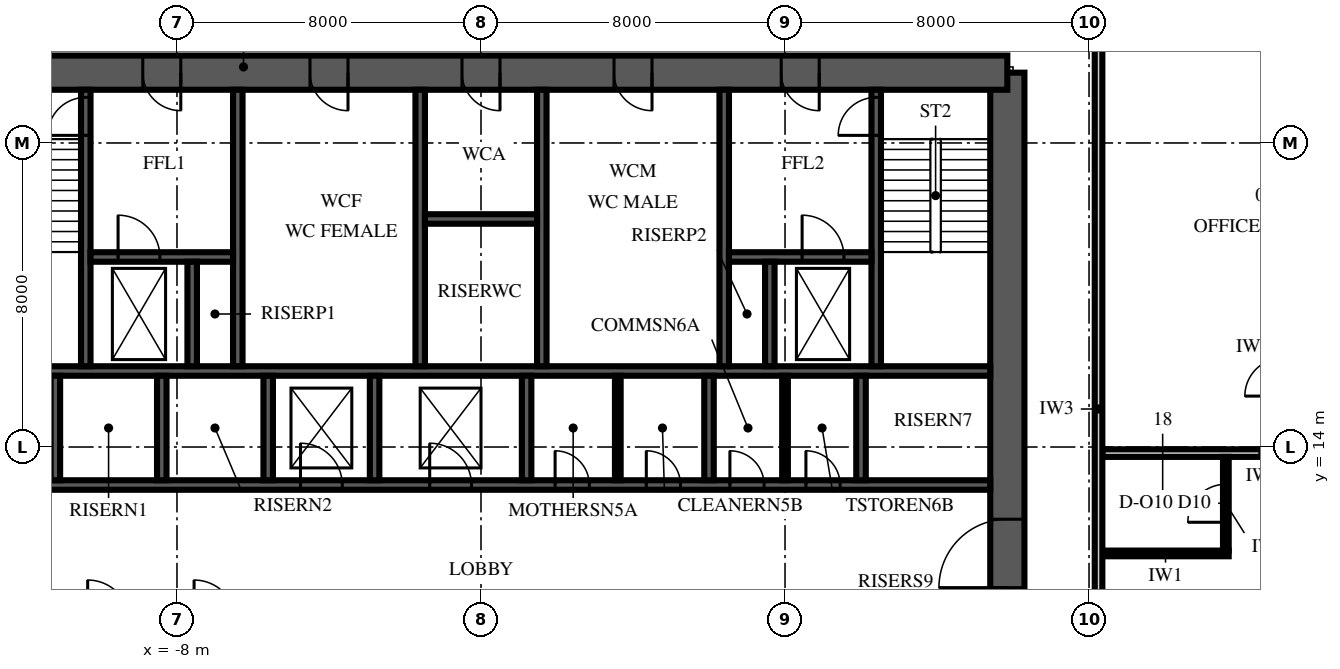
"""IFC4 building model, lengths in metres.
Left out: names, types, materials, properties, quantities, classifications, styles, units other than length and angle.
Written with IfcOpenShell. Run it as: python <this file> out.ifc"""

import sys

from ifc_helpers import new_model, si_unit, direction, frame, frame_2d, origin, place, context, subcontext, project, spatial, polyline, rectangle, outline, extrude, element, fill, save


model = new_model("IFC4")
c1 = context("Model", 3, precision=1e-05, world=origin(), true_north=direction((0.0, 1.0)))
c2 = subcontext(c1, "Body", "Model", "MODEL_VIEW")
j1 = project(units=[si_unit("LENGTHUNIT", "METRE"), si_unit("PLANEANGLEUNIT", "RADIAN")], contexts=[c1])
p1 = place(None, origin())
s1 = spatial("IfcSite", under=j1, at=p1, CompositionType="ELEMENT")
p2 = place(p1, origin())
s2 = spatial("IfcBuilding", under=s1, at=p2, CompositionType="ELEMENT")
p3 = place(p2, frame((0.0, 0.0, 36.0)))
s3 = spatial("IfcBuildingStorey", under=s2, at=p3, CompositionType="ELEMENT", Elevation=36.0)
p4 = place(p3, frame((13.85, 6.15, 0.0), z_axis=(0.0, 0.0, 1.0), x_axis=(0.0, 1.0, 0.0)))
e1 = element("IfcWall", 1, at=p4, inside=s3, PredefinedType="SHEAR", context=c2, shape_type="SweptSolid", body=[
    extrude(outline(polyline([(0.0, -0.45), (17.7, -0.45), (17.7, 0.0), (17.25, 0.0), (17.25, 0.45), (0.45, 0.45), (0.45, 0.0), (0.0, 0.0), (0.0, -0.45)])), origin(), (0.0, 0.0, 1.0), 4.0),
])
p5 = place(p4, frame((4.15, 0.0, 0.0)))
e2 = element("IfcOpeningElement", 2, at=p5, cuts=e1, PredefinedType="OPENING", context=c2, shape_type="SweptSolid", body=[
    extrude(rectangle(XDim=1.8, YDim=2.4, at=frame_2d((0.9, 1.2))), frame((0.0, 0.465, 0.0), z_axis=(0.0, -1.0, 0.0), x_axis=(1.0, 0.0, 0.0)), (0.0, 0.0, 1.0), 0.93),
])
p6 = place(p3, frame((13.85, 23.85, 0.0), z_axis=(0.0, 0.0, 1.0), x_axis=(-1.0, 0.0, 0.0)))
e3 = element("IfcWall", 3, at=p6, inside=s3, PredefinedType="SHEAR", context=c2, shape_type="SweptSolid", body=[
    extrude(rectangle(XDim=27.7, YDim=0.9, at=frame_2d((13.85, 0.0))), origin(), (0.0, 0.0, 1.0), 4.0),
])
p7 = place(p6, frame((21.75, 0.0, 0.0)))
e4 = element("IfcOpeningElement", 4, at=p7, cuts=e3, PredefinedType="OPENING", context=c2, shape_type="SweptSolid", body=[
    extrude(rectangle(XDim=1.0, YDim=2.1, at=frame_2d((0.5, 1.05))), frame((0.0, 0.465, 0.0), z_axis=(0.0, -1.0, 0.0), x_axis=(1.0, 0.0, 0.0)), (0.0, 0.0, 1.0), 0.93),
])
p8 = place(p6, frame((4.95, 0.0, 0.0)))
e5 = element("IfcOpeningElement", 5, at=p8, cuts=e3, PredefinedType="OPENING", context=c2, shape_type="SweptSolid", body=[
    extrude(rectangle(XDim=1.0, YDim=2.1, at=frame_2d((0.5, 1.05))), frame((0.0, 0.465, 0.0), z_axis=(0.0, -1.0, 0.0), x_axis=(1.0, 0.0, 0.0)), (0.0, 0.0, 1.0), 0.93),
])
p9 = place(p6, frame((17.35, 0.0, 0.0)))
e6 = element("IfcOpeningElement", 6, at=p9, cuts=e3, PredefinedType="OPENING", context=c2, shape_type="SweptSolid", body=[
    extrude(rectangle(XDim=1.0, YDim=2.1, at=frame_2d((0.5, 1.05))), frame((0.0, 0.465, 0.0), z_axis=(0.0, -1.0, 0.0), x_axis=(1.0, 0.0, 0.0)), (0.0, 0.0, 1.0), 0.93),
])
p10 = place(p6, frame((13.35, 0.0, 0.0)))
e7 = element("IfcOpeningElement", 7, at=p10, cuts=e3, PredefinedType="OPENING", context=c2, shape_type="SweptSolid", body=[
    extrude(rectangle(XDim=1.0, YDim=2.1, at=frame_2d((0.5, 1.05))), frame((0.0, 0.465, 0.0), z_axis=(0.0, -1.0, 0.0), x_axis=(1.0, 0.0, 0.0)), (0.0, 0.0, 1.0), 0.93),
])
p11 = place(p6, frame((9.35, 0.0, 0.0)))
e8 = element("IfcOpeningElement", 8, at=p11, cuts=e3, PredefinedType="OPENING", context=c2, shape_type="SweptSolid", body=[
    extrude(rectangle(XDim=1.0, YDim=2.1, at=frame_2d((0.5, 1.05))), frame((0.0, 0.465, 0.0), z_axis=(0.0, -1.0, 0.0), x_axis=(1.0, 0.0, 0.0)), (0.0, 0.0, 1.0), 0.93),
])
p12 = place(p3, frame((-13.4, 13.0, 0.0), z_axis=(0.0, 0.0, 1.0), x_axis=(1.0, 0.0, 0.0)))
e9 = element("IfcWall", 9, at=p12, inside=s3, PredefinedType="SHEAR", context=c2, shape_type="SweptSolid", body=[
    extrude(rectangle(XDim=26.8, YDim=0.25, at=frame_2d((13.4, 0.0))), origin(), (0.0, 0.0, 1.0), 4.0),
])
p13 = place(p12, frame((0.25, 0.0, 0.0)))
e10 = element("IfcOpeningElement", 10, at=p13, cuts=e9, PredefinedType="OPENING", context=c2, shape_type="SweptSolid", body=[
    extrude(rectangle(XDim=1.1, YDim=2.1, at=frame_2d((0.55, 1.05))), frame((0.0, 0.14, 0.0), z_axis=(0.0, -1.0, 0.0), x_axis=(1.0, 0.0, 0.0)), (0.0, 0.0, 1.0), 0.28),
])
p14 = place(p12, frame((8.65, 0.0, 0.0)))
e11 = element("IfcOpeningElement", 11, at=p14, cuts=e9, PredefinedType="OPENING", context=c2, shape_type="SweptSolid", body=[
    extrude(rectangle(XDim=1.1, YDim=2.1, at=frame_2d((0.55, 1.05))), frame((0.0, 0.14, 0.0), z_axis=(0.0, -1.0, 0.0), x_axis=(1.0, 0.0, 0.0)), (0.0, 0.0, 1.0), 0.28),
])
p15 = place(p12, frame((12.05, 0.0, 0.0)))
e12 = element("IfcOpeningElement", 12, at=p15, cuts=e9, PredefinedType="OPENING", context=c2, shape_type="SweptSolid", body=[
    extrude(rectangle(XDim=1.1, YDim=2.1, at=frame_2d((0.55, 1.05))), frame((0.0, 0.14, 0.0), z_axis=(0.0, -1.0, 0.0), x_axis=(1.0, 0.0, 0.0)), (0.0, 0.0, 1.0), 0.28),
])
p16 = place(p12, frame((15.35, 0.0, 0.0)))
e13 = element("IfcOpeningElement", 13, at=p16, cuts=e9, PredefinedType="OPENING", context=c2, shape_type="SweptSolid", body=[
    extrude(rectangle(XDim=0.9, YDim=2.1, at=frame_2d((0.45, 1.05))), frame((0.0, 0.14, 0.0), z_axis=(0.0, -1.0, 0.0), x_axis=(1.0, 0.0, 0.0)), (0.0, 0.0, 1.0), 0.28),
])
p17 = place(p12, frame((17.75, 0.0, 0.0)))
e14 = element("IfcOpeningElement", 14, at=p17, cuts=e9, PredefinedType="OPENING", context=c2, shape_type="SweptSolid", body=[
    extrude(rectangle(XDim=0.9, YDim=2.1, at=frame_2d((0.45, 1.05))), frame((0.0, 0.14, 0.0), z_axis=(0.0, -1.0, 0.0), x_axis=(1.0, 0.0, 0.0)), (0.0, 0.0, 1.0), 0.28),
])
p18 = place(p12, frame((19.95, 0.0, 0.0)))
e15 = element("IfcOpeningElement", 15, at=p18, cuts=e9, PredefinedType="OPENING", context=c2, shape_type="SweptSolid", body=[
    extrude(rectangle(XDim=0.9, YDim=2.1, at=frame_2d((0.45, 1.05))), frame((0.0, 0.14, 0.0), z_axis=(0.0, -1.0, 0.0), x_axis=(1.0, 0.0, 0.0)), (0.0, 0.0, 1.0), 0.28),
])
p19 = place(p12, frame((21.95, 0.0, 0.0)))
e16 = element("IfcOpeningElement", 16, at=p19, cuts=e9, PredefinedType="OPENING", context=c2, shape_type="SweptSolid", body=[
    extrude(rectangle(XDim=0.9, YDim=2.1, at=frame_2d((0.45, 1.05))), frame((0.0, 0.14, 0.0), z_axis=(0.0, -1.0, 0.0), x_axis=(1.0, 0.0, 0.0)), (0.0, 0.0, 1.0), 0.28),
])
p20 = place(p3, frame((-13.4, 16.0, 0.0), z_axis=(0.0, 0.0, 1.0), x_axis=(1.0, 0.0, 0.0)))
e17 = element("IfcWall", 17, at=p20, inside=s3, PredefinedType="SHEAR", context=c2, shape_type="SweptSolid", body=[
    extrude(rectangle(XDim=26.8, YDim=0.25, at=frame_2d((13.4, 0.0))), origin(), (0.0, 0.0, 1.0), 4.0),
])
for number, where, z_axis, x_axis in (
    (18, (-11.2, 13.125, 0.0), (0.0, 0.0, 1.0), (0.0, 1.0, 0.0)),
    (19, (-8.4, 13.125, 0.0), (0.0, 0.0, 1.0), (0.0, 1.0, 0.0)),
    (20, (-5.6, 13.125, 0.0), (0.0, 0.0, 1.0), (0.0, 1.0, 0.0)),
    (21, (-2.8, 13.125, 0.0), (0.0, 0.0, 1.0), (0.0, 1.0, 0.0)),
    (22, (1.2, 13.125, 0.0), (0.0, 0.0, 1.0), (0.0, 1.0, 0.0)),
    (23, (6.0, 13.125, 0.0), (0.0, 0.0, 1.0), (0.0, 1.0, 0.0)),
    (24, (10.0, 13.125, 0.0), (0.0, 0.0, 1.0), (0.0, 1.0, 0.0)),
):
    element("IfcWall", number, at=place(p3, frame(where, z_axis=z_axis, x_axis=x_axis)), inside=s3, PredefinedType="SHEAR", context=c2, shape_type="SweptSolid", body=[
        extrude(rectangle(XDim=2.75, YDim=0.25, at=frame_2d((1.375, 0.0))), origin(), (0.0, 0.0, 1.0), 4.0),
    ])
p21 = place(p3, frame((-10.4, 16.125, 0.0), z_axis=(0.0, 0.0, 1.0), x_axis=(0.0, 1.0, 0.0)))
e25 = element("IfcWall", 25, at=p21, inside=s3, PredefinedType="SHEAR", context=c2, shape_type="SweptSolid", body=[
    extrude(rectangle(XDim=7.275, YDim=0.25, at=frame_2d((3.637, 0.0))), origin(), (0.0, 0.0, 1.0), 4.0),
])
p22 = place(p21, frame((6.075, 0.0, 0.0)))
e26 = element("IfcOpeningElement", 26, at=p22, cuts=e25, PredefinedType="OPENING", context=c2, shape_type="SweptSolid", body=[
    extrude(rectangle(XDim=1.0, YDim=2.1, at=frame_2d((0.5, 1.05))), frame((0.0, 0.14, 0.0), z_axis=(0.0, -1.0, 0.0), x_axis=(1.0, 0.0, 0.0)), (0.0, 0.0, 1.0), 0.28),
])
for number, where, z_axis, x_axis in (
    (27, (-6.4, 16.125, 0.0), (0.0, 0.0, 1.0), (0.0, 1.0, 0.0)),
    (28, (-1.6, 16.125, 0.0), (0.0, 0.0, 1.0), (0.0, 1.0, 0.0)),
    (29, (1.6, 16.125, 0.0), (0.0, 0.0, 1.0), (0.0, 1.0, 0.0)),
    (30, (6.4, 16.125, 0.0), (0.0, 0.0, 1.0), (0.0, 1.0, 0.0)),
):
    element("IfcWall", number, at=place(p3, frame(where, z_axis=z_axis, x_axis=x_axis)), inside=s3, PredefinedType="SHEAR", context=c2, shape_type="SweptSolid", body=[
        extrude(rectangle(XDim=7.275, YDim=0.25, at=frame_2d((3.637, 0.0))), origin(), (0.0, 0.0, 1.0), 4.0),
    ])
p23 = place(p3, frame((10.4, 16.125, 0.0), z_axis=(0.0, 0.0, 1.0), x_axis=(0.0, 1.0, 0.0)))
e31 = element("IfcWall", 31, at=p23, inside=s3, PredefinedType="SHEAR", context=c2, shape_type="SweptSolid", body=[
    extrude(rectangle(XDim=7.275, YDim=0.25, at=frame_2d((3.637, 0.0))), origin(), (0.0, 0.0, 1.0), 4.0),
])
p24 = place(p23, frame((6.075, 0.0, 0.0)))
e32 = element("IfcOpeningElement", 32, at=p24, cuts=e31, PredefinedType="OPENING", context=c2, shape_type="SweptSolid", body=[
    extrude(rectangle(XDim=1.0, YDim=2.1, at=frame_2d((0.5, 1.05))), frame((0.0, 0.14, 0.0), z_axis=(0.0, -1.0, 0.0), x_axis=(1.0, 0.0, 0.0)), (0.0, 0.0, 1.0), 0.28),
])
p25 = place(p3, frame((-10.275, 19.0, 0.0), z_axis=(0.0, 0.0, 1.0), x_axis=(1.0, 0.0, 0.0)))
e33 = element("IfcWall", 33, at=p25, inside=s3, PredefinedType="SHEAR", context=c2, shape_type="SweptSolid", body=[
    extrude(rectangle(XDim=3.75, YDim=0.25, at=frame_2d((1.875, 0.0))), origin(), (0.0, 0.0, 1.0), 4.0),
])
p26 = place(p25, frame((0.725, 0.0, 0.0)))
e34 = element("IfcOpeningElement", 34, at=p26, cuts=e33, PredefinedType="OPENING", context=c2, shape_type="SweptSolid", body=[
    extrude(rectangle(XDim=1.1, YDim=2.1, at=frame_2d((0.55, 1.05))), frame((0.0, 0.14, 0.0), z_axis=(0.0, -1.0, 0.0), x_axis=(1.0, 0.0, 0.0)), (0.0, 0.0, 1.0), 0.28),
])
p27 = place(p3, frame((6.525, 19.0, 0.0), z_axis=(0.0, 0.0, 1.0), x_axis=(1.0, 0.0, 0.0)))
e35 = element("IfcWall", 35, at=p27, inside=s3, PredefinedType="SHEAR", context=c2, shape_type="SweptSolid", body=[
    extrude(rectangle(XDim=3.75, YDim=0.25, at=frame_2d((1.875, 0.0))), origin(), (0.0, 0.0, 1.0), 4.0),
])
p28 = place(p27, frame((1.925, 0.0, 0.0)))
e36 = element("IfcOpeningElement", 36, at=p28, cuts=e35, PredefinedType="OPENING", context=c2, shape_type="SweptSolid", body=[
    extrude(rectangle(XDim=1.1, YDim=2.1, at=frame_2d((0.55, 1.05))), frame((0.0, 0.14, 0.0), z_axis=(0.0, -1.0, 0.0), x_axis=(1.0, 0.0, 0.0)), (0.0, 0.0, 1.0), 0.28),
])
for number, where, z_axis, x_axis in (
    (37, (-7.6, 16.125, 0.0), (0.0, 0.0, 1.0), (0.0, 1.0, 0.0)),
    (38, (7.6, 16.125, 0.0), (0.0, 0.0, 1.0), (0.0, 1.0, 0.0)),
):
    element("IfcWall", number, at=place(p3, frame(where, z_axis=z_axis, x_axis=x_axis)), inside=s3, PredefinedType="SHEAR", context=c2, shape_type="SweptSolid", body=[
        extrude(rectangle(XDim=2.75, YDim=0.25, at=frame_2d((1.375, 0.0))), origin(), (0.0, 0.0, 1.0), 4.0),
    ])
p29 = place(p3, frame((-1.475, 20.0, 0.0), z_axis=(0.0, 0.0, 1.0), x_axis=(1.0, 0.0, 0.0)))
e39 = element("IfcWall", 39, at=p29, inside=s3, PredefinedType="SHEAR", context=c2, shape_type="SweptSolid", body=[
    extrude(rectangle(XDim=2.95, YDim=0.25, at=frame_2d((1.475, 0.0))), origin(), (0.0, 0.0, 1.0), 4.0),
])
for number, where, z_axis, x_axis in (
    (40, (3.6, 13.125, 0.0), (0.0, 0.0, 1.0), (0.0, 1.0, 0.0)),
    (41, (8.0, 13.125, 0.0), (0.0, 0.0, 1.0), (0.0, 1.0, 0.0)),
):
    element("IfcWall", number, at=place(p3, frame(where, z_axis=z_axis, x_axis=x_axis)), inside=s3, PredefinedType="PARTITIONING", context=c2, shape_type="SweptSolid", body=[
        extrude(rectangle(XDim=2.75, YDim=0.15, at=frame_2d((1.375, 0.0))), origin(), (0.0, 0.0, 1.0), 3.85),
    ])
p30 = place(p3, frame((16.35, 11.2, 0.0), z_axis=(0.0, 0.0, 1.0), x_axis=(1.0, 0.0, 0.0)))
e42 = element("IfcWall", 42, at=p30, inside=s3, PredefinedType="PARTITIONING", context=c2, shape_type="SweptSolid", body=[
    extrude(rectangle(XDim=3.325, YDim=0.15, at=frame_2d((1.663, 0.0))), origin(), (0.0, 0.0, 1.0), 3.85),
])
p31 = place(p3, frame((16.35, 13.84, 0.0), z_axis=(0.0, 0.0, 1.0), x_axis=(1.0, 0.0, 0.0)))
e43 = element("IfcWall", 43, at=p31, inside=s3, PredefinedType="PARTITIONING", context=c2, shape_type="SweptSolid", body=[
    extrude(rectangle(XDim=8.446, YDim=0.2, at=frame_2d((4.223, 0.0))), origin(), (0.0, 0.0, 1.0), 3.25),
])
p32 = place(p3, frame((16.25, 3.85, 0.0), z_axis=(0.0, 0.0, 1.0), x_axis=(0.0, 1.0, 0.0)))
e44 = element("IfcWall", 44, at=p32, inside=s3, PredefinedType="PARTITIONING", context=c2, shape_type="SweptSolid", body=[
    extrude(rectangle(XDim=22.3, YDim=0.2, at=frame_2d((11.15, 0.0))), origin(), (0.0, 0.0, 1.0), 2.842),
])
p33 = place(p32, frame((4.55, 0.0, 0.0)))
e45 = element("IfcOpeningElement", 45, at=p33, cuts=e44, PredefinedType="OPENING", context=c2, shape_type="SweptSolid", body=[
    extrude(rectangle(XDim=1.2, YDim=2.4, at=frame_2d((0.6, 1.2))), frame((0.0, 0.115, 0.0), z_axis=(0.0, -1.0, 0.0), x_axis=(1.0, 0.0, 0.0)), (0.0, 0.0, 1.0), 0.23),
])
p34 = place(p3, frame((19.6, 11.275, 0.0), z_axis=(0.0, 0.0, 1.0), x_axis=(0.0, 1.0, 0.0)))
e46 = element("IfcWall", 46, at=p34, inside=s3, PredefinedType="PARTITIONING", context=c2, shape_type="SweptSolid", body=[
    extrude(rectangle(XDim=2.465, YDim=0.15, at=frame_2d((1.232, 0.0))), origin(), (0.0, 0.0, 1.0), 3.85),
])
p35 = place(p34, frame((0.745, 0.0, 0.0)))
e47 = element("IfcOpeningElement", 47, at=p35, cuts=e46, PredefinedType="OPENING", context=c2, shape_type="SweptSolid", body=[
    extrude(rectangle(XDim=1.0, YDim=2.3, at=frame_2d((0.5, 1.15))), frame((0.0, 0.09, 0.0), z_axis=(0.0, -1.0, 0.0), x_axis=(1.0, 0.0, 0.0)), (0.0, 0.0, 1.0), 0.18),
])
p36 = place(p5, origin())
e48 = element("IfcDoor", 48, at=p36, inside=s3, OperationType="DOUBLE_DOOR_SINGLE_SWING", PredefinedType="DOOR", context=c2, shape_type="SweptSolid", body=[
    extrude(rectangle(XDim=1.8, YDim=2.4, at=frame_2d((0.9, 1.2))), frame((0.0, 0.45, 0.0), z_axis=(0.0, -1.0, 0.0), x_axis=(1.0, 0.0, 0.0)), (0.0, 0.0, 1.0), 0.899),
])
fill(e2, e48)
p37 = place(p7, origin())
e49 = element("IfcDoor", 49, at=p37, inside=s3, OperationType="SINGLE_SWING_RIGHT", PredefinedType="DOOR", context=c2, shape_type="SweptSolid", body=[
    extrude(rectangle(XDim=1.0, YDim=2.1, at=frame_2d((0.5, 1.05))), frame((0.0, 0.45, 0.0), z_axis=(0.0, -1.0, 0.0), x_axis=(1.0, 0.0, 0.0)), (0.0, 0.0, 1.0), 0.899),
])
fill(e4, e49)
p38 = place(p8, origin())
e50 = element("IfcDoor", 50, at=p38, inside=s3, OperationType="SINGLE_SWING_RIGHT", PredefinedType="DOOR", context=c2, shape_type="SweptSolid", body=[
    extrude(rectangle(XDim=1.0, YDim=2.1, at=frame_2d((0.5, 1.05))), frame((0.0, 0.45, 0.0), z_axis=(0.0, -1.0, 0.0), x_axis=(1.0, 0.0, 0.0)), (0.0, 0.0, 1.0), 0.899),
])
fill(e5, e50)
p39 = place(p9, origin())
e51 = element("IfcDoor", 51, at=p39, inside=s3, OperationType="SINGLE_SWING_LEFT", PredefinedType="DOOR", context=c2, shape_type="SweptSolid", body=[
    extrude(rectangle(XDim=1.0, YDim=2.1, at=frame_2d((0.5, 1.05))), frame((0.0, 0.45, 0.0), z_axis=(0.0, -1.0, 0.0), x_axis=(1.0, 0.0, 0.0)), (0.0, 0.0, 1.0), 0.899),
])
fill(e6, e51)
p40 = place(p10, origin())
e52 = element("IfcDoor", 52, at=p40, inside=s3, OperationType="SINGLE_SWING_LEFT", PredefinedType="DOOR", context=c2, shape_type="SweptSolid", body=[
    extrude(rectangle(XDim=1.0, YDim=2.1, at=frame_2d((0.5, 1.05))), frame((0.0, 0.45, 0.0), z_axis=(0.0, -1.0, 0.0), x_axis=(1.0, 0.0, 0.0)), (0.0, 0.0, 1.0), 0.899),
])
fill(e7, e52)
p41 = place(p11, origin())
e53 = element("IfcDoor", 53, at=p41, inside=s3, OperationType="SINGLE_SWING_LEFT", PredefinedType="DOOR", context=c2, shape_type="SweptSolid", body=[
    extrude(rectangle(XDim=1.0, YDim=2.1, at=frame_2d((0.5, 1.05))), frame((0.0, 0.45, 0.0), z_axis=(0.0, -1.0, 0.0), x_axis=(1.0, 0.0, 0.0)), (0.0, 0.0, 1.0), 0.899),
])
fill(e8, e53)
p42 = place(p22, origin())
e54 = element("IfcDoor", 54, at=p42, inside=s3, OperationType="SINGLE_SWING_LEFT", PredefinedType="DOOR", context=c2, shape_type="SweptSolid", body=[
    extrude(rectangle(XDim=1.0, YDim=2.1, at=frame_2d((0.5, 1.05))), frame((0.0, 0.125, 0.0), z_axis=(0.0, -1.0, 0.0), x_axis=(1.0, 0.0, 0.0)), (0.0, 0.0, 1.0), 0.25),
])
fill(e26, e54)
p43 = place(p24, origin())
e55 = element("IfcDoor", 55, at=p43, inside=s3, OperationType="SINGLE_SWING_LEFT", PredefinedType="DOOR", context=c2, shape_type="SweptSolid", body=[
    extrude(rectangle(XDim=1.0, YDim=2.1, at=frame_2d((0.5, 1.05))), frame((0.0, 0.125, 0.0), z_axis=(0.0, -1.0, 0.0), x_axis=(1.0, 0.0, 0.0)), (0.0, 0.0, 1.0), 0.25),
])
fill(e32, e55)
p44 = place(p14, origin())
e56 = element("IfcDoor", 56, at=p44, inside=s3, OperationType="SLIDING_TO_LEFT", PredefinedType="DOOR", context=c2, shape_type="SweptSolid", body=[
    extrude(rectangle(XDim=1.1, YDim=2.1, at=frame_2d((0.55, 1.05))), frame((0.0, 0.125, 0.0), z_axis=(0.0, -1.0, 0.0), x_axis=(1.0, 0.0, 0.0)), (0.0, 0.0, 1.0), 0.25),
])
fill(e11, e56)
p45 = place(p15, origin())
e57 = element("IfcDoor", 57, at=p45, inside=s3, OperationType="SLIDING_TO_LEFT", PredefinedType="DOOR", context=c2, shape_type="SweptSolid", body=[
    extrude(rectangle(XDim=1.1, YDim=2.1, at=frame_2d((0.55, 1.05))), frame((0.0, 0.125, 0.0), z_axis=(0.0, -1.0, 0.0), x_axis=(1.0, 0.0, 0.0)), (0.0, 0.0, 1.0), 0.25),
])
fill(e12, e57)
p46 = place(p28, origin())
e58 = element("IfcDoor", 58, at=p46, inside=s3, OperationType="SLIDING_TO_RIGHT", PredefinedType="DOOR", context=c2, shape_type="SweptSolid", body=[
    extrude(rectangle(XDim=1.1, YDim=2.1, at=frame_2d((0.55, 1.05))), frame((0.0, 0.125, 0.0), z_axis=(0.0, -1.0, 0.0), x_axis=(1.0, 0.0, 0.0)), (0.0, 0.0, 1.0), 0.25),
])
fill(e36, e58)
p47 = place(p26, origin())
e59 = element("IfcDoor", 59, at=p47, inside=s3, OperationType="SLIDING_TO_RIGHT", PredefinedType="DOOR", context=c2, shape_type="SweptSolid", body=[
    extrude(rectangle(XDim=1.1, YDim=2.1, at=frame_2d((0.55, 1.05))), frame((0.0, 0.125, 0.0), z_axis=(0.0, -1.0, 0.0), x_axis=(1.0, 0.0, 0.0)), (0.0, 0.0, 1.0), 0.25),
])
fill(e34, e59)
p48 = place(p16, origin())
e60 = element("IfcDoor", 60, at=p48, inside=s3, OperationType="SINGLE_SWING_LEFT", PredefinedType="DOOR", context=c2, shape_type="SweptSolid", body=[
    extrude(rectangle(XDim=0.9, YDim=2.1, at=frame_2d((0.45, 1.05))), frame((0.0, 0.125, 0.0), z_axis=(0.0, -1.0, 0.0), x_axis=(1.0, 0.0, 0.0)), (0.0, 0.0, 1.0), 0.25),
])
fill(e13, e60)
p49 = place(p17, origin())
e61 = element("IfcDoor", 61, at=p49, inside=s3, OperationType="SINGLE_SWING_LEFT", PredefinedType="DOOR", context=c2, shape_type="SweptSolid", body=[
    extrude(rectangle(XDim=0.9, YDim=2.1, at=frame_2d((0.45, 1.05))), frame((0.0, 0.125, 0.0), z_axis=(0.0, -1.0, 0.0), x_axis=(1.0, 0.0, 0.0)), (0.0, 0.0, 1.0), 0.25),
])
fill(e14, e61)
p50 = place(p18, origin())
e62 = element("IfcDoor", 62, at=p50, inside=s3, OperationType="SINGLE_SWING_LEFT", PredefinedType="DOOR", context=c2, shape_type="SweptSolid", body=[
    extrude(rectangle(XDim=0.9, YDim=2.1, at=frame_2d((0.45, 1.05))), frame((0.0, 0.125, 0.0), z_axis=(0.0, -1.0, 0.0), x_axis=(1.0, 0.0, 0.0)), (0.0, 0.0, 1.0), 0.25),
])
fill(e15, e62)
p51 = place(p19, origin())
e63 = element("IfcDoor", 63, at=p51, inside=s3, OperationType="SINGLE_SWING_LEFT", PredefinedType="DOOR", context=c2, shape_type="SweptSolid", body=[
    extrude(rectangle(XDim=0.9, YDim=2.1, at=frame_2d((0.45, 1.05))), frame((0.0, 0.125, 0.0), z_axis=(0.0, -1.0, 0.0), x_axis=(1.0, 0.0, 0.0)), (0.0, 0.0, 1.0), 0.25),
])
fill(e16, e63)
p52 = place(p35, origin())
e64 = element("IfcDoor", 64, at=p52, inside=s3, OperationType="SINGLE_SWING_LEFT", PredefinedType="DOOR", context=c2, shape_type="SweptSolid", body=[
    extrude(rectangle(XDim=1.0, YDim=2.3, at=frame_2d((0.5, 1.15))), frame((0.0, 0.075, 0.0), z_axis=(0.0, -1.0, 0.0), x_axis=(1.0, 0.0, 0.0)), (0.0, 0.0, 1.0), 0.149),
])
fill(e47, e64)
save(model, sys.argv[1])
